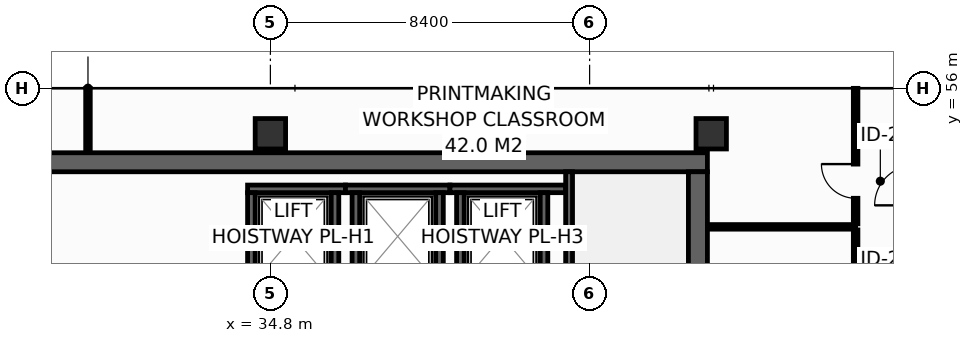
"""IFC4 building model, lengths in metres.
Left out: names, types, materials, properties, quantities, classifications, styles, units other than length and angle.
Written with IfcOpenShell. Run it as: python <this file> out.ifc"""

import sys

from ifc_helpers import new_model, si_unit, direction, frame, frame_2d, origin, origin_2d, place, context, subcontext, project, spatial, rectangle, hollow_rectangle, extrude, element, fill, save


model = new_model("IFC4")
c1 = context("Model", 3, precision=1e-05, world=origin(), true_north=direction((0.0, 1.0)))
c2 = subcontext(c1, "Body", "Model", "MODEL_VIEW")
j1 = project(units=[si_unit("LENGTHUNIT", "METRE"), si_unit("PLANEANGLEUNIT", "RADIAN")], contexts=[c1])
p1 = place(None, origin())
s1 = spatial("IfcSite", under=j1, at=p1, CompositionType="ELEMENT")
p2 = place(p1, origin())
s2 = spatial("IfcBuilding", under=s1, at=p2, CompositionType="ELEMENT")
p3 = place(p2, frame((0.0, 0.0, 220.8)))
s3 = spatial("IfcBuildingStorey", under=s2, at=p3, CompositionType="ELEMENT", Elevation=220.8)
p4 = place(p3, frame((13.6, 54.05, 0.0), z_axis=(0.0, 0.0, 1.0), x_axis=(1.0, 0.0, 0.0)))
e1 = element("IfcWall", 1, at=p4, inside=s3, PredefinedType="SHEAR", context=c2, shape_type="SweptSolid", body=[
    extrude(rectangle(XDim=32.7, YDim=0.5, at=frame_2d((16.35, 0.0))), origin(), (0.0, 0.0, 1.0), 3.35),
])
p5 = place(p3, frame((46.05, 43.4, 0.0), z_axis=(0.0, 0.0, 1.0), x_axis=(0.0, 1.0, 0.0)))
e2 = element("IfcWall", 2, at=p5, inside=s3, PredefinedType="SHEAR", context=c2, shape_type="SweptSolid", body=[
    extrude(rectangle(XDim=10.4, YDim=0.5, at=frame_2d((5.2, 0.0))), origin(), (0.0, 0.0, 1.0), 3.35),
])
for number, where, z_axis, x_axis in (
    (3, (34.8, 54.8, 0.0), (0.0, 0.0, 1.0), (1.0, 0.0, 0.0)),
    (4, (46.4, 54.8, 0.0), (0.0, 0.0, 1.0), (1.0, 0.0, 0.0)),
):
    element("IfcColumn", number, at=place(p3, frame(where, z_axis=z_axis, x_axis=x_axis)), inside=s3, PredefinedType="COLUMN", context=c2, shape_type="SweptSolid", body=[
        extrude(hollow_rectangle(XDim=0.8, YDim=0.8, WallThickness=0.036, at=origin_2d()), origin(), (0.0, 0.0, 1.0), 3.8),
    ])
p6 = place(p3, frame((34.2, 53.35, 0.0), z_axis=(0.0, 0.0, 1.0), x_axis=(1.0, 0.0, 0.0)))
e5 = element("IfcWall", 5, at=p6, inside=s3, PredefinedType="SHEAR", context=c2, shape_type="SweptSolid", body=[
    extrude(rectangle(XDim=2.575, YDim=0.2, at=frame_2d((1.288, 0.0))), origin(), (0.0, 0.0, 1.0), 3.35),
])
for number, where, z_axis, x_axis in (
    (6, (34.3, 50.95, 0.0), (0.0, 0.0, 1.0), (0.0, 1.0, 0.0)),
    (7, (36.5, 50.95, 0.0), (0.0, 0.0, 1.0), (0.0, 1.0, 0.0)),
):
    element("IfcWall", number, at=place(p3, frame(where, z_axis=z_axis, x_axis=x_axis)), inside=s3, PredefinedType="SHEAR", context=c2, shape_type="SweptSolid", body=[
        extrude(rectangle(XDim=2.3, YDim=0.2, at=frame_2d((1.15, 0.0))), origin(), (0.0, 0.0, 1.0), 3.35),
    ])
p7 = place(p3, frame((36.775, 53.35, 0.0), z_axis=(0.0, 0.0, 1.0), x_axis=(1.0, 0.0, 0.0)))
e8 = element("IfcWall", 8, at=p7, inside=s3, PredefinedType="SHEAR", context=c2, shape_type="SweptSolid", body=[
    extrude(rectangle(XDim=2.75, YDim=0.2, at=frame_2d((1.375, 0.0))), origin(), (0.0, 0.0, 1.0), 3.35),
])
for number, where, z_axis, x_axis in (
    (9, (37.05, 50.95, 0.0), (0.0, 0.0, 1.0), (0.0, 1.0, 0.0)),
    (10, (39.25, 50.95, 0.0), (0.0, 0.0, 1.0), (0.0, 1.0, 0.0)),
):
    element("IfcWall", number, at=place(p3, frame(where, z_axis=z_axis, x_axis=x_axis)), inside=s3, PredefinedType="SHEAR", context=c2, shape_type="SweptSolid", body=[
        extrude(rectangle(XDim=2.3, YDim=0.2, at=frame_2d((1.15, 0.0))), origin(), (0.0, 0.0, 1.0), 3.35),
    ])
p8 = place(p3, frame((39.525, 53.35, 0.0), z_axis=(0.0, 0.0, 1.0), x_axis=(1.0, 0.0, 0.0)))
e11 = element("IfcWall", 11, at=p8, inside=s3, PredefinedType="SHEAR", context=c2, shape_type="SweptSolid", body=[
    extrude(rectangle(XDim=3.045, YDim=0.2, at=frame_2d((1.522, 0.0))), origin(), (0.0, 0.0, 1.0), 3.35),
])
for number, where, z_axis, x_axis in (
    (12, (39.8, 50.95, 0.0), (0.0, 0.0, 1.0), (0.0, 1.0, 0.0)),
    (13, (42.0, 50.95, 0.0), (0.0, 0.0, 1.0), (0.0, 1.0, 0.0)),
):
    element("IfcWall", number, at=place(p3, frame(where, z_axis=z_axis, x_axis=x_axis)), inside=s3, PredefinedType="SHEAR", context=c2, shape_type="SweptSolid", body=[
        extrude(rectangle(XDim=2.3, YDim=0.2, at=frame_2d((1.15, 0.0))), origin(), (0.0, 0.0, 1.0), 3.35),
    ])
p9 = place(p3, frame((42.66, 53.8, 0.0), z_axis=(0.0, 0.0, 1.0), x_axis=(0.0, -1.0, 0.0)))
e14 = element("IfcWall", 14, at=p9, inside=s3, PredefinedType="SHEAR", context=c2, shape_type="SweptSolid", body=[
    extrude(rectangle(XDim=10.4, YDim=0.18, at=frame_2d((5.2, 0.0))), origin(), (0.0, 0.0, 1.0), 3.35),
])
p10 = place(p9, frame((8.99, 0.0, 0.0)))
e15 = element("IfcOpeningElement", 15, at=p10, cuts=e14, PredefinedType="OPENING", context=c2, shape_type="SweptSolid", body=[
    extrude(rectangle(XDim=1.1, YDim=2.15, at=frame_2d((0.55, 1.075))), frame((0.0, 0.1, 0.0), z_axis=(0.0, -1.0, 0.0), x_axis=(1.0, 0.0, 0.0)), (0.0, 0.0, 1.0), 0.2),
])
p11 = place(p3, frame((46.32, 52.35, 0.0), z_axis=(0.0, 0.0, 1.0), x_axis=(1.0, 0.0, 0.0)))
e16 = element("IfcWall", 16, at=p11, inside=s3, PredefinedType="PARTITIONING", context=c2, shape_type="SweptSolid", body=[
    extrude(rectangle(XDim=3.88, YDim=0.12, at=frame_2d((1.94, 0.0))), origin(), (0.0, 0.0, 1.0), 3.35),
])
p12 = place(p3, frame((30.0, 54.32, 0.0), z_axis=(0.0, 0.0, 1.0), x_axis=(0.0, 1.0, 0.0)))
e17 = element("IfcWall", 17, at=p12, inside=s3, PredefinedType="PARTITIONING", context=c2, shape_type="SweptSolid", body=[
    extrude(rectangle(XDim=1.675, YDim=0.12, at=frame_2d((0.837, 0.0))), origin(), (0.0, 0.0, 1.0), 2.735),
])
p13 = place(p3, frame((50.2, 48.29, 0.0), z_axis=(0.0, 0.0, 1.0), x_axis=(0.0, 1.0, 0.0)))
e18 = element("IfcWall", 18, at=p13, inside=s3, PredefinedType="PARTITIONING", context=c2, shape_type="SweptSolid", body=[
    extrude(rectangle(XDim=3.98, YDim=0.12, at=frame_2d((1.99, 0.0))), origin(), (0.0, 0.0, 1.0), 3.35),
])
p14 = place(p13, frame((1.54, 0.0, 0.0)))
e19 = element("IfcOpeningElement", 19, at=p14, cuts=e18, PredefinedType="OPENING", context=c2, shape_type="SweptSolid", body=[
    extrude(rectangle(XDim=0.9, YDim=2.1, at=frame_2d((0.45, 1.05))), frame((0.0, 0.07, 0.0), z_axis=(0.0, -1.0, 0.0), x_axis=(1.0, 0.0, 0.0)), (0.0, 0.0, 1.0), 0.14),
])
p15 = place(p3, frame((50.2, 52.43, 0.0), z_axis=(0.0, 0.0, 1.0), x_axis=(0.0, 1.0, 0.0)))
e20 = element("IfcWall", 20, at=p15, inside=s3, PredefinedType="PARTITIONING", context=c2, shape_type="SweptSolid", body=[
    extrude(rectangle(XDim=3.565, YDim=0.12, at=frame_2d((1.783, 0.0))), origin(), (0.0, 0.0, 1.0), 2.735),
])
p16 = place(p15, frame((0.672, 0.0, 0.0)))
e21 = element("IfcOpeningElement", 21, at=p16, cuts=e20, PredefinedType="OPENING", context=c2, shape_type="SweptSolid", body=[
    extrude(rectangle(XDim=0.9, YDim=2.1, at=frame_2d((0.45, 1.05))), frame((0.0, 0.07, 0.0), z_axis=(0.0, -1.0, 0.0), x_axis=(1.0, 0.0, 0.0)), (0.0, 0.0, 1.0), 0.14),
])
p17 = place(p16, origin())
e22 = element("IfcDoor", 22, at=p17, inside=s3, OperationType="SINGLE_SWING_RIGHT", PredefinedType="DOOR", context=c2, shape_type="SweptSolid", body=[
    extrude(rectangle(XDim=0.9, YDim=2.1, at=frame_2d((0.45, 1.05))), frame((0.0, 0.025, 0.0), z_axis=(0.0, -1.0, 0.0), x_axis=(1.0, 0.0, 0.0)), (0.0, 0.0, 1.0), 0.05),
])
fill(e21, e22)
save(model, sys.argv[1])
